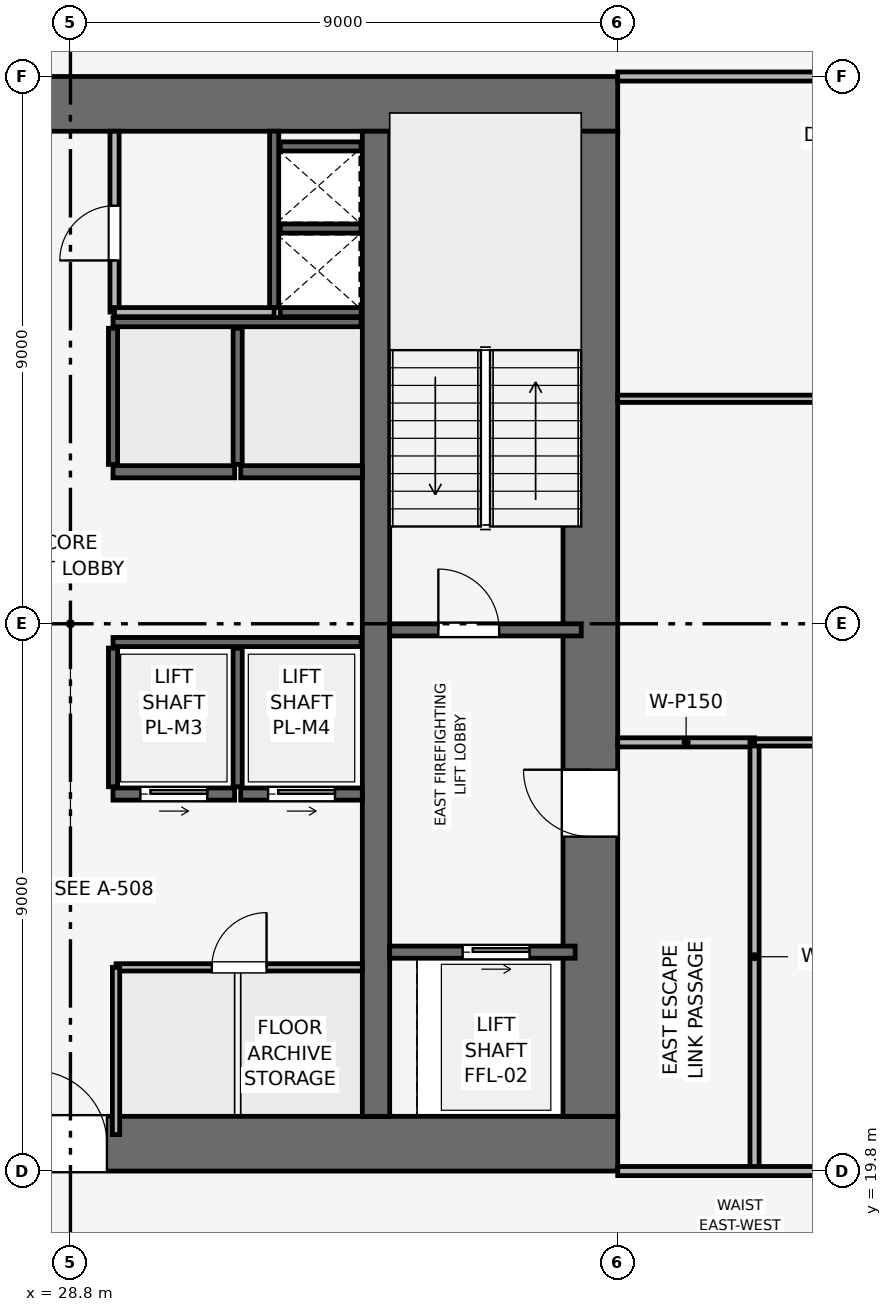
"""IFC4 building model, lengths in metres.
Left out: names, types, materials, properties, quantities, classifications, styles, units other than length and angle.
Written with IfcOpenShell. Run it as: python <this file> out.ifc"""

import sys

from ifc_helpers import new_model, si_unit, direction, frame, frame_2d, origin, place, context, subcontext, project, spatial, rectangle, extrude, element, fill, save


model = new_model("IFC4")
c1 = context("Model", 3, precision=1e-05, world=origin(), true_north=direction((0.0, 1.0)))
c2 = subcontext(c1, "Body", "Model", "MODEL_VIEW")
j1 = project(units=[si_unit("LENGTHUNIT", "METRE"), si_unit("PLANEANGLEUNIT", "RADIAN")], contexts=[c1])
p1 = place(None, origin())
s1 = spatial("IfcSite", under=j1, at=p1, CompositionType="ELEMENT")
p2 = place(p1, origin())
s2 = spatial("IfcBuilding", under=s1, at=p2, CompositionType="ELEMENT")
p3 = place(p2, frame((0.0, 0.0, 179.55)))
s3 = spatial("IfcBuildingStorey", under=s2, at=p3, CompositionType="ELEMENT", Elevation=179.55)
p4 = place(p3, frame((19.8, 20.25, 0.0), z_axis=(0.0, 0.0, 1.0), x_axis=(1.0, 0.0, 0.0)))
e1 = element("IfcWall", 1, at=p4, inside=s3, PredefinedType="SHEAR", context=c2, shape_type="SweptSolid", body=[
    extrude(rectangle(XDim=18.0, YDim=0.9, at=frame_2d((9.0, 0.0))), origin(), (0.0, 0.0, 1.0), 3.75),
])
p5 = place(p4, frame((8.4, 0.0, 0.0)))
e2 = element("IfcOpeningElement", 2, at=p5, cuts=e1, PredefinedType="OPENING", context=c2, shape_type="SweptSolid", body=[
    extrude(rectangle(XDim=1.2, YDim=2.2, at=frame_2d((0.6, 1.1))), frame((0.0, 0.46, 0.0), z_axis=(0.0, -1.0, 0.0), x_axis=(1.0, 0.0, 0.0)), (0.0, 0.0, 1.0), 0.92),
])
p6 = place(p3, frame((19.8, 37.35, 0.0), z_axis=(0.0, 0.0, 1.0), x_axis=(1.0, 0.0, 0.0)))
e3 = element("IfcWall", 3, at=p6, inside=s3, PredefinedType="SHEAR", context=c2, shape_type="SweptSolid", body=[
    extrude(rectangle(XDim=18.0, YDim=0.9, at=frame_2d((9.0, 0.0))), origin(), (0.0, 0.0, 1.0), 3.75),
])
p7 = place(p6, frame((7.05, 0.0, 0.0)))
e4 = element("IfcOpeningElement", 4, at=p7, cuts=e3, PredefinedType="OPENING", context=c2, shape_type="SweptSolid", body=[
    extrude(rectangle(XDim=1.1, YDim=2.15, at=frame_2d((0.55, 1.075))), frame((0.0, 0.46, 0.0), z_axis=(0.0, -1.0, 0.0), x_axis=(1.0, 0.0, 0.0)), (0.0, 0.0, 1.0), 0.92),
])
p8 = place(p3, frame((37.35, 20.7, 0.0), z_axis=(0.0, 0.0, 1.0), x_axis=(0.0, 1.0, 0.0)))
e5 = element("IfcWall", 5, at=p8, inside=s3, PredefinedType="SHEAR", context=c2, shape_type="SweptSolid", body=[
    extrude(rectangle(XDim=16.2, YDim=0.9, at=frame_2d((8.1, 0.0))), origin(), (0.0, 0.0, 1.0), 3.75),
])
p9 = place(p8, frame((4.6, 0.0, 0.0)))
e6 = element("IfcOpeningElement", 6, at=p9, cuts=e5, PredefinedType="OPENING", context=c2, shape_type="SweptSolid", body=[
    extrude(rectangle(XDim=1.1, YDim=2.15, at=frame_2d((0.55, 1.075))), frame((0.0, 0.46, 0.0), z_axis=(0.0, -1.0, 0.0), x_axis=(1.0, 0.0, 0.0)), (0.0, 0.0, 1.0), 0.92),
])
p10 = place(p3, frame((33.825, 20.7, 0.0), z_axis=(0.0, 0.0, 1.0), x_axis=(0.0, 1.0, 0.0)))
e7 = element("IfcWall", 7, at=p10, inside=s3, PredefinedType="SHEAR", context=c2, shape_type="SweptSolid", body=[
    extrude(rectangle(XDim=16.2, YDim=0.45, at=frame_2d((8.1, 0.0))), origin(), (0.0, 0.0, 1.0), 3.75),
])
p11 = place(p3, frame((34.05, 28.7, 0.0), z_axis=(0.0, 0.0, 1.0), x_axis=(1.0, 0.0, 0.0)))
e8 = element("IfcWall", 8, at=p11, inside=s3, PredefinedType="SHEAR", context=c2, shape_type="SweptSolid", body=[
    extrude(rectangle(XDim=3.15, YDim=0.2, at=frame_2d((1.575, 0.0))), origin(), (0.0, 0.0, 1.0), 3.495),
])
p12 = place(p11, frame((0.8, 0.0, 0.0)))
e9 = element("IfcOpeningElement", 9, at=p12, cuts=e8, PredefinedType="OPENING", context=c2, shape_type="SweptSolid", body=[
    extrude(rectangle(XDim=1.0, YDim=2.1, at=frame_2d((0.5, 1.05))), frame((0.0, 0.11, 0.0), z_axis=(0.0, -1.0, 0.0), x_axis=(1.0, 0.0, 0.0)), (0.0, 0.0, 1.0), 0.22),
])
p13 = place(p3, frame((32.15, 34.0, 0.0), z_axis=(0.0, 0.0, 1.0), x_axis=(0.0, 1.0, 0.0)))
e10 = element("IfcWall", 10, at=p13, inside=s3, PredefinedType="SHEAR", context=c2, shape_type="SweptSolid", body=[
    extrude(rectangle(XDim=2.9, YDim=0.15, at=frame_2d((1.45, 0.0))), origin(), (0.0, 0.0, 1.0), 3.495),
])
for number, where, z_axis, x_axis in (
    (11, (32.25, 33.925, 0.0), (0.0, 0.0, 1.0), (1.0, 0.0, 0.0)),
    (12, (32.25, 35.3, 0.0), (0.0, 0.0, 1.0), (1.0, 0.0, 0.0)),
):
    element("IfcWall", number, at=place(p3, frame(where, z_axis=z_axis, x_axis=x_axis)), inside=s3, PredefinedType="SHEAR", context=c2, shape_type="SweptSolid", body=[
        extrude(rectangle(XDim=1.33, YDim=0.15, at=frame_2d((0.665, 0.0))), origin(), (0.0, 0.0, 1.0), 3.495),
    ])
p14 = place(p3, frame((34.05, 23.4, 0.0), z_axis=(0.0, 0.0, 1.0), x_axis=(1.0, 0.0, 0.0)))
e13 = element("IfcWall", 13, at=p14, inside=s3, PredefinedType="SHEAR", context=c2, shape_type="SweptSolid", body=[
    extrude(rectangle(XDim=3.05, YDim=0.2, at=frame_2d((1.525, 0.0))), origin(), (0.0, 0.0, 1.0), 3.495),
])
p15 = place(p14, frame((1.2, 0.0, 0.0)))
e14 = element("IfcOpeningElement", 14, at=p15, cuts=e13, PredefinedType="OPENING", context=c2, shape_type="SweptSolid", body=[
    extrude(rectangle(XDim=1.1, YDim=2.15, at=frame_2d((0.55, 1.075))), frame((0.0, 0.11, 0.0), z_axis=(0.0, -1.0, 0.0), x_axis=(1.0, 0.0, 0.0)), (0.0, 0.0, 1.0), 0.22),
])
p16 = place(p3, frame((29.5, 26.0, 0.0), z_axis=(0.0, 0.0, 1.0), x_axis=(1.0, 0.0, 0.0)))
e15 = element("IfcWall", 15, at=p16, inside=s3, PredefinedType="SHEAR", context=c2, shape_type="SweptSolid", body=[
    extrude(rectangle(XDim=2.0, YDim=0.2, at=frame_2d((1.0, 0.0))), origin(), (0.0, 0.0, 1.0), 3.495),
])
p17 = place(p16, frame((0.45, 0.0, 0.0)))
e16 = element("IfcOpeningElement", 16, at=p17, cuts=e15, PredefinedType="OPENING", context=c2, shape_type="SweptSolid", body=[
    extrude(rectangle(XDim=1.1, YDim=2.15, at=frame_2d((0.55, 1.075))), frame((0.0, 0.11, 0.0), z_axis=(0.0, -1.0, 0.0), x_axis=(1.0, 0.0, 0.0)), (0.0, 0.0, 1.0), 0.22),
])
p18 = place(p3, frame((31.6, 26.0, 0.0), z_axis=(0.0, 0.0, 1.0), x_axis=(1.0, 0.0, 0.0)))
e17 = element("IfcWall", 17, at=p18, inside=s3, PredefinedType="SHEAR", context=c2, shape_type="SweptSolid", body=[
    extrude(rectangle(XDim=2.0, YDim=0.2, at=frame_2d((1.0, 0.0))), origin(), (0.0, 0.0, 1.0), 3.495),
])
p19 = place(p18, frame((0.45, 0.0, 0.0)))
e18 = element("IfcOpeningElement", 18, at=p19, cuts=e17, PredefinedType="OPENING", context=c2, shape_type="SweptSolid", body=[
    extrude(rectangle(XDim=1.1, YDim=2.15, at=frame_2d((0.55, 1.075))), frame((0.0, 0.11, 0.0), z_axis=(0.0, -1.0, 0.0), x_axis=(1.0, 0.0, 0.0)), (0.0, 0.0, 1.0), 0.22),
])
for number, where, z_axis, x_axis in (
    (19, (29.5, 31.3, 0.0), (0.0, 0.0, 1.0), (1.0, 0.0, 0.0)),
    (20, (31.6, 31.3, 0.0), (0.0, 0.0, 1.0), (1.0, 0.0, 0.0)),
):
    element("IfcWall", number, at=place(p3, frame(where, z_axis=z_axis, x_axis=x_axis)), inside=s3, PredefinedType="SHEAR", context=c2, shape_type="SweptSolid", body=[
        extrude(rectangle(XDim=2.0, YDim=0.2, at=frame_2d((1.0, 0.0))), origin(), (0.0, 0.0, 1.0), 3.495),
    ])
p20 = place(p3, frame((32.25, 36.65, 0.0), z_axis=(0.0, 0.0, 1.0), x_axis=(1.0, 0.0, 0.0)))
e21 = element("IfcWall", 21, at=p20, inside=s3, PredefinedType="SHEAR", context=c2, shape_type="SweptSolid", body=[
    extrude(rectangle(XDim=1.33, YDim=0.15, at=frame_2d((0.665, 0.0))), origin(), (0.0, 0.0, 1.0), 3.495),
])
p21 = place(p3, frame((29.5, 28.5, 0.0), z_axis=(0.0, 0.0, 1.0), x_axis=(1.0, 0.0, 0.0)))
e22 = element("IfcWall", 22, at=p21, inside=s3, PredefinedType="SHEAR", context=c2, shape_type="SweptSolid", body=[
    extrude(rectangle(XDim=4.08, YDim=0.15, at=frame_2d((2.04, 0.0))), origin(), (0.0, 0.0, 1.0), 3.495),
])
for number, where, z_axis, x_axis in (
    (23, (29.5, 26.12, 0.0), (0.0, 0.0, 1.0), (0.0, 1.0, 0.0)),
    (24, (31.55, 26.12, 0.0), (0.0, 0.0, 1.0), (0.0, 1.0, 0.0)),
):
    element("IfcWall", number, at=place(p3, frame(where, z_axis=z_axis, x_axis=x_axis)), inside=s3, PredefinedType="SHEAR", context=c2, shape_type="SweptSolid", body=[
        extrude(rectangle(XDim=2.28, YDim=0.15, at=frame_2d((1.14, 0.0))), origin(), (0.0, 0.0, 1.0), 3.495),
    ])
p22 = place(p3, frame((29.5, 33.76, 0.0), z_axis=(0.0, 0.0, 1.0), x_axis=(1.0, 0.0, 0.0)))
e25 = element("IfcWall", 25, at=p22, inside=s3, PredefinedType="SHEAR", context=c2, shape_type="SweptSolid", body=[
    extrude(rectangle(XDim=4.08, YDim=0.15, at=frame_2d((2.04, 0.0))), origin(), (0.0, 0.0, 1.0), 3.495),
])
for number, where, z_axis, x_axis in (
    (26, (29.5, 31.42, 0.0), (0.0, 0.0, 1.0), (0.0, 1.0, 0.0)),
    (27, (31.55, 31.42, 0.0), (0.0, 0.0, 1.0), (0.0, 1.0, 0.0)),
):
    element("IfcWall", number, at=place(p3, frame(where, z_axis=z_axis, x_axis=x_axis)), inside=s3, PredefinedType="SHEAR", context=c2, shape_type="SweptSolid", body=[
        extrude(rectangle(XDim=2.24, YDim=0.15, at=frame_2d((1.12, 0.0))), origin(), (0.0, 0.0, 1.0), 3.495),
    ])
p23 = place(p3, frame((29.525, 33.925, 0.0), z_axis=(0.0, 0.0, 1.0), x_axis=(0.0, 1.0, 0.0)))
e28 = element("IfcWall", 28, at=p23, inside=s3, PredefinedType="PARTITIONING", context=c2, shape_type="SweptSolid", body=[
    extrude(rectangle(XDim=2.975, YDim=0.15, at=frame_2d((1.487, 0.0))), origin(), (0.0, 0.0, 1.0), 3.495),
])
p24 = place(p23, frame((0.85, 0.0, 0.0)))
e29 = element("IfcOpeningElement", 29, at=p24, cuts=e28, PredefinedType="OPENING", context=c2, shape_type="SweptSolid", body=[
    extrude(rectangle(XDim=0.9, YDim=2.1, at=frame_2d((0.45, 1.05))), frame((0.0, 0.085, 0.0), z_axis=(0.0, -1.0, 0.0), x_axis=(1.0, 0.0, 0.0)), (0.0, 0.0, 1.0), 0.17),
])
p25 = place(p3, frame((29.525, 33.925, 0.0), z_axis=(0.0, 0.0, 1.0), x_axis=(1.0, 0.0, 0.0)))
e30 = element("IfcWall", 30, at=p25, inside=s3, PredefinedType="PARTITIONING", context=c2, shape_type="SweptSolid", body=[
    extrude(rectangle(XDim=2.625, YDim=0.15, at=frame_2d((1.312, 0.0))), origin(), (0.0, 0.0, 1.0), 3.495),
])
p26 = place(p3, frame((29.55, 23.15, 0.0), z_axis=(0.0, 0.0, 1.0), x_axis=(1.0, 0.0, 0.0)))
e31 = element("IfcWall", 31, at=p26, inside=s3, PredefinedType="PARTITIONING", context=c2, shape_type="SweptSolid", body=[
    extrude(rectangle(XDim=4.05, YDim=0.12, at=frame_2d((2.025, 0.0))), origin(), (0.0, 0.0, 1.0), 3.495),
])
p27 = place(p26, frame((1.575, 0.0, 0.0)))
e32 = element("IfcOpeningElement", 32, at=p27, cuts=e31, PredefinedType="OPENING", context=c2, shape_type="SweptSolid", body=[
    extrude(rectangle(XDim=0.9, YDim=2.1, at=frame_2d((0.45, 1.05))), frame((0.0, 0.07, 0.0), z_axis=(0.0, -1.0, 0.0), x_axis=(1.0, 0.0, 0.0)), (0.0, 0.0, 1.0), 0.14),
])
p28 = place(p3, frame((29.55, 20.4, 0.0), z_axis=(0.0, 0.0, 1.0), x_axis=(0.0, 1.0, 0.0)))
e33 = element("IfcWall", 33, at=p28, inside=s3, PredefinedType="PARTITIONING", context=c2, shape_type="SweptSolid", body=[
    extrude(rectangle(XDim=2.75, YDim=0.12, at=frame_2d((1.375, 0.0))), origin(), (0.0, 0.0, 1.0), 3.495),
])
p29 = place(p3, frame((37.8, 26.85, 0.0), z_axis=(0.0, 0.0, 1.0), x_axis=(1.0, 0.0, 0.0)))
e34 = element("IfcWall", 34, at=p29, inside=s3, PredefinedType="PARTITIONING", context=c2, shape_type="SweptSolid", body=[
    extrude(rectangle(XDim=2.25, YDim=0.15, at=frame_2d((1.125, 0.0))), origin(), (0.0, 0.0, 1.0), 3.495),
])
p30 = place(p3, frame((40.05, 19.8, 0.0), z_axis=(0.0, 0.0, 1.0), x_axis=(0.0, 1.0, 0.0)))
e35 = element("IfcWall", 35, at=p30, inside=s3, PredefinedType="PARTITIONING", context=c2, shape_type="SweptSolid", body=[
    extrude(rectangle(XDim=7.05, YDim=0.15, at=frame_2d((3.525, 0.0))), origin(), (0.0, 0.0, 1.0), 3.03),
])
p31 = place(p3, frame((40.05, 26.85, 0.0), z_axis=(0.0, 0.0, 1.0), x_axis=(1.0, 0.0, 0.0)))
e36 = element("IfcWall", 36, at=p31, inside=s3, PredefinedType="PARTITIONING", context=c2, shape_type="SweptSolid", body=[
    extrude(rectangle(XDim=12.92, YDim=0.12, at=frame_2d((6.46, 0.0))), origin(), (0.0, 0.0, 1.0), 2.98),
])
p32 = place(p31, frame((6.01, 0.0, 0.0)))
e37 = element("IfcOpeningElement", 37, at=p32, cuts=e36, PredefinedType="OPENING", context=c2, shape_type="SweptSolid", body=[
    extrude(rectangle(XDim=0.9, YDim=2.1, at=frame_2d((0.45, 1.05))), frame((0.0, 0.07, 0.0), z_axis=(0.0, -1.0, 0.0), x_axis=(1.0, 0.0, 0.0)), (0.0, 0.0, 1.0), 0.14),
])
p33 = place(p3, frame((37.8, 32.5, 0.0), z_axis=(0.0, 0.0, 1.0), x_axis=(1.0, 0.0, 0.0)))
e38 = element("IfcWall", 38, at=p33, inside=s3, PredefinedType="PARTITIONING", context=c2, shape_type="SweptSolid", body=[
    extrude(rectangle(XDim=15.17, YDim=0.12, at=frame_2d((7.585, 0.0))), origin(), (0.0, 0.0, 1.0), 2.98),
])
p34 = place(p3, frame((37.8, 19.8, 0.0), z_axis=(0.0, 0.0, 1.0), x_axis=(1.0, 0.0, 0.0)))
e39 = element("IfcWall", 39, at=p34, inside=s3, PredefinedType="PARTITIONING", context=c2, shape_type="SweptSolid", body=[
    extrude(rectangle(XDim=15.17, YDim=0.15, at=frame_2d((7.585, 0.0))), origin(), (0.0, 0.0, 1.0), 2.98),
])
p35 = place(p34, frame((4.4, 0.0, 0.0)))
e40 = element("IfcOpeningElement", 40, at=p35, cuts=e39, PredefinedType="OPENING", context=c2, shape_type="SweptSolid", body=[
    extrude(rectangle(XDim=0.9, YDim=2.1, at=frame_2d((0.45, 1.05))), frame((0.0, 0.085, 0.0), z_axis=(0.0, -1.0, 0.0), x_axis=(1.0, 0.0, 0.0)), (0.0, 0.0, 1.0), 0.17),
])
p36 = place(p3, frame((37.8, 37.8, 0.0), z_axis=(0.0, 0.0, 1.0), x_axis=(1.0, 0.0, 0.0)))
e41 = element("IfcWall", 41, at=p36, inside=s3, PredefinedType="PARTITIONING", context=c2, shape_type="SweptSolid", body=[
    extrude(rectangle(XDim=15.17, YDim=0.15, at=frame_2d((7.585, 0.0))), origin(), (0.0, 0.0, 1.0), 2.98),
])
p37 = place(p36, frame((3.4, 0.0, 0.0)))
e42 = element("IfcOpeningElement", 42, at=p37, cuts=e41, PredefinedType="OPENING", context=c2, shape_type="SweptSolid", body=[
    extrude(rectangle(XDim=0.9, YDim=2.1, at=frame_2d((0.45, 1.05))), frame((0.0, 0.085, 0.0), z_axis=(0.0, -1.0, 0.0), x_axis=(1.0, 0.0, 0.0)), (0.0, 0.0, 1.0), 0.17),
])
p38 = place(p12, origin())
e43 = element("IfcDoor", 43, at=p38, inside=s3, OperationType="SINGLE_SWING_LEFT", PredefinedType="DOOR", context=c2, shape_type="SweptSolid", body=[
    extrude(rectangle(XDim=1.0, YDim=2.1, at=frame_2d((0.5, 1.05))), frame((0.0, 0.025, 0.0), z_axis=(0.0, -1.0, 0.0), x_axis=(1.0, 0.0, 0.0)), (0.0, 0.0, 1.0), 0.05),
])
fill(e9, e43)
p39 = place(p15, origin())
e44 = element("IfcDoor", 44, at=p39, inside=s3, OperationType="SLIDING_TO_RIGHT", PredefinedType="DOOR", context=c2, shape_type="SweptSolid", body=[
    extrude(rectangle(XDim=1.1, YDim=2.15, at=frame_2d((0.55, 1.075))), frame((0.0, 0.025, 0.0), z_axis=(0.0, -1.0, 0.0), x_axis=(1.0, 0.0, 0.0)), (0.0, 0.0, 1.0), 0.05),
])
fill(e14, e44)
p40 = place(p17, origin())
e45 = element("IfcDoor", 45, at=p40, inside=s3, OperationType="SLIDING_TO_RIGHT", PredefinedType="DOOR", context=c2, shape_type="SweptSolid", body=[
    extrude(rectangle(XDim=1.1, YDim=2.15, at=frame_2d((0.55, 1.075))), frame((0.0, 0.025, 0.0), z_axis=(0.0, -1.0, 0.0), x_axis=(1.0, 0.0, 0.0)), (0.0, 0.0, 1.0), 0.05),
])
fill(e16, e45)
p41 = place(p19, origin())
e46 = element("IfcDoor", 46, at=p41, inside=s3, OperationType="SLIDING_TO_RIGHT", PredefinedType="DOOR", context=c2, shape_type="SweptSolid", body=[
    extrude(rectangle(XDim=1.1, YDim=2.15, at=frame_2d((0.55, 1.075))), frame((0.0, 0.025, 0.0), z_axis=(0.0, -1.0, 0.0), x_axis=(1.0, 0.0, 0.0)), (0.0, 0.0, 1.0), 0.05),
])
fill(e18, e46)
p42 = place(p24, origin())
e47 = element("IfcDoor", 47, at=p42, inside=s3, OperationType="SINGLE_SWING_LEFT", PredefinedType="DOOR", context=c2, shape_type="SweptSolid", body=[
    extrude(rectangle(XDim=0.9, YDim=2.1, at=frame_2d((0.45, 1.05))), frame((0.0, 0.025, 0.0), z_axis=(0.0, -1.0, 0.0), x_axis=(1.0, 0.0, 0.0)), (0.0, 0.0, 1.0), 0.05),
])
fill(e29, e47)
p43 = place(p27, origin())
e48 = element("IfcDoor", 48, at=p43, inside=s3, OperationType="SINGLE_SWING_RIGHT", PredefinedType="DOOR", context=c2, shape_type="SweptSolid", body=[
    extrude(rectangle(XDim=0.9, YDim=2.1, at=frame_2d((0.45, 1.05))), frame((0.0, 0.025, 0.0), z_axis=(0.0, -1.0, 0.0), x_axis=(1.0, 0.0, 0.0)), (0.0, 0.0, 1.0), 0.05),
])
fill(e32, e48)
p44 = place(p9, origin())
e49 = element("IfcDoor", 49, at=p44, inside=s3, OperationType="SINGLE_SWING_RIGHT", PredefinedType="DOOR", context=c2, shape_type="SweptSolid", body=[
    extrude(rectangle(XDim=1.1, YDim=2.15, at=frame_2d((0.55, 1.075))), frame((0.0, 0.025, 0.0), z_axis=(0.0, -1.0, 0.0), x_axis=(1.0, 0.0, 0.0)), (0.0, 0.0, 1.0), 0.05),
])
fill(e6, e49)
p45 = place(p5, origin())
e50 = element("IfcDoor", 50, at=p45, inside=s3, OperationType="SINGLE_SWING_LEFT", PredefinedType="DOOR", context=c2, shape_type="SweptSolid", body=[
    extrude(rectangle(XDim=1.2, YDim=2.2, at=frame_2d((0.6, 1.1))), frame((0.0, 0.025, 0.0), z_axis=(0.0, -1.0, 0.0), x_axis=(1.0, 0.0, 0.0)), (0.0, 0.0, 1.0), 0.05),
])
fill(e2, e50)
save(model, sys.argv[1])
